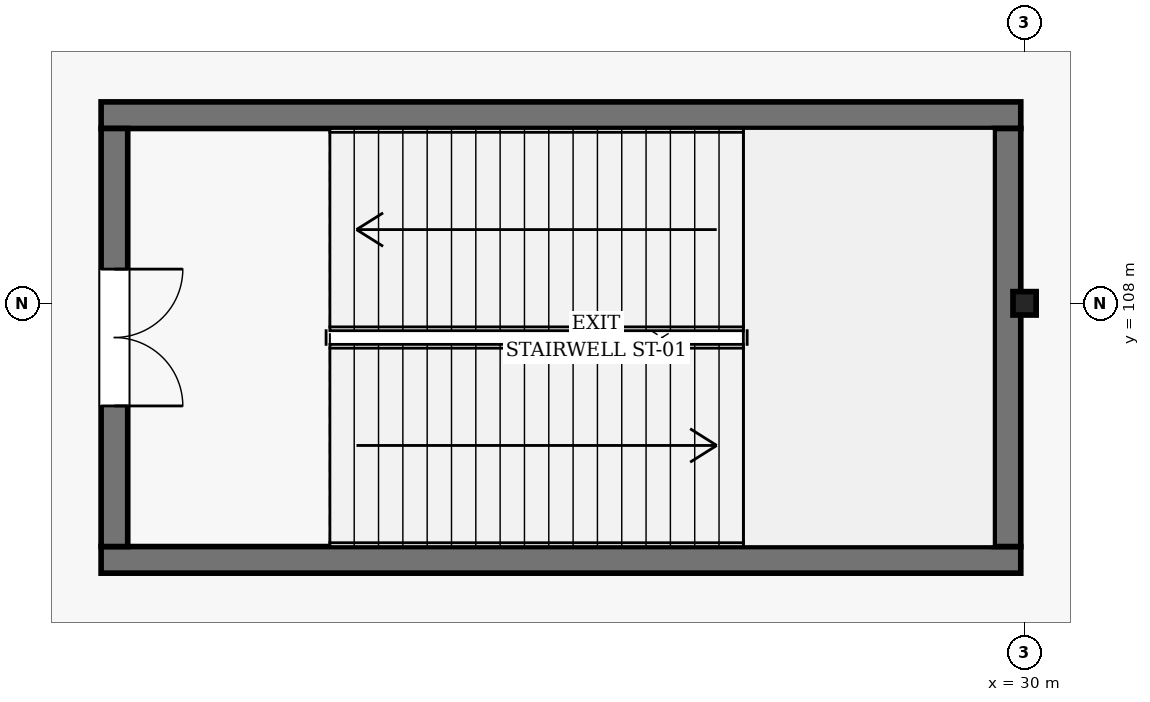
"""IFC4 building model, lengths in metres.
Left out: names, types, materials, properties, quantities, classifications, styles, units other than length and angle.
Written with IfcOpenShell. Run it as: python <this file> out.ifc"""

import sys

from ifc_helpers import new_model, si_unit, direction, frame, frame_2d, origin, origin_2d, place, context, subcontext, project, spatial, rectangle, i_section, extrude, element, fill, save


model = new_model("IFC4")
c1 = context("Model", 3, precision=1e-05, world=origin(), true_north=direction((0.0, 1.0)))
c2 = subcontext(c1, "Body", "Model", "MODEL_VIEW")
j1 = project(units=[si_unit("LENGTHUNIT", "METRE"), si_unit("PLANEANGLEUNIT", "RADIAN")], contexts=[c1])
p1 = place(None, origin())
s1 = spatial("IfcSite", under=j1, at=p1, CompositionType="ELEMENT")
p2 = place(p1, origin())
s2 = spatial("IfcBuilding", under=s1, at=p2, CompositionType="ELEMENT")
p3 = place(p2, origin())
s3 = spatial("IfcBuildingStorey", under=s2, at=p3, CompositionType="ELEMENT", Elevation=0.0)
p4 = place(p3, frame((30.0, 108.0, 0.0), z_axis=(0.0, 0.0, 1.0), x_axis=(1.0, 0.0, 0.0)))
e1 = element("IfcColumn", 1, at=p4, inside=s3, PredefinedType="COLUMN", context=c2, shape_type="SweptSolid", body=[
    extrude(i_section(OverallWidth=0.305, OverallDepth=0.308, WebThickness=0.01, FlangeThickness=0.015, FilletRadius=0.015, at=origin_2d()), origin(), (0.0, 0.0, 1.0), 5.4),
])
for number, where, z_axis, x_axis in (
    (2, (17.85, 104.625, 0.0), (0.0, 0.0, 1.0), (1.0, 0.0, 0.0)),
    (3, (29.95, 110.475, 0.0), (0.0, 0.0, 1.0), (-1.0, 0.0, 0.0)),
):
    element("IfcWall", number, at=place(p3, frame(where, z_axis=z_axis, x_axis=x_axis)), inside=s3, PredefinedType="SHEAR", context=c2, shape_type="SweptSolid", body=[
        extrude(rectangle(XDim=12.1, YDim=0.35, at=frame_2d((6.05, 0.0))), origin(), (0.0, 0.0, 1.0), 5.18),
    ])
p5 = place(p3, frame((18.025, 110.3, 0.0), z_axis=(0.0, 0.0, 1.0), x_axis=(0.0, -1.0, 0.0)))
e4 = element("IfcWall", 4, at=p5, inside=s3, PredefinedType="SHEAR", context=c2, shape_type="SweptSolid", body=[
    extrude(rectangle(XDim=5.5, YDim=0.35, at=frame_2d((2.75, 0.0))), origin(), (0.0, 0.0, 1.0), 5.18),
])
p6 = place(p5, frame((1.85, 0.0, 0.0)))
e5 = element("IfcOpeningElement", 5, at=p6, cuts=e4, PredefinedType="OPENING", context=c2, shape_type="SweptSolid", body=[
    extrude(rectangle(XDim=1.8, YDim=2.2, at=frame_2d((0.9, 1.1))), frame((0.0, 0.185, 0.0), z_axis=(0.0, -1.0, 0.0), x_axis=(1.0, 0.0, 0.0)), (0.0, 0.0, 1.0), 0.37),
])
p7 = place(p3, frame((29.775, 104.8, 0.0), z_axis=(0.0, 0.0, 1.0), x_axis=(0.0, 1.0, 0.0)))
e6 = element("IfcWall", 6, at=p7, inside=s3, PredefinedType="SHEAR", context=c2, shape_type="SweptSolid", body=[
    extrude(rectangle(XDim=5.5, YDim=0.35, at=frame_2d((2.75, 0.0))), origin(), (0.0, 0.0, 1.0), 5.18),
])
p8 = place(p6, origin())
e7 = element("IfcDoor", 7, at=p8, inside=s3, OperationType="DOUBLE_DOOR_SINGLE_SWING", PredefinedType="DOOR", context=c2, shape_type="SweptSolid", body=[
    extrude(rectangle(XDim=1.8, YDim=2.2, at=frame_2d((0.9, 1.1))), frame((0.0, 0.025, 0.0), z_axis=(0.0, -1.0, 0.0), x_axis=(1.0, 0.0, 0.0)), (0.0, 0.0, 1.0), 0.05),
])
fill(e5, e7)
save(model, sys.argv[1])
